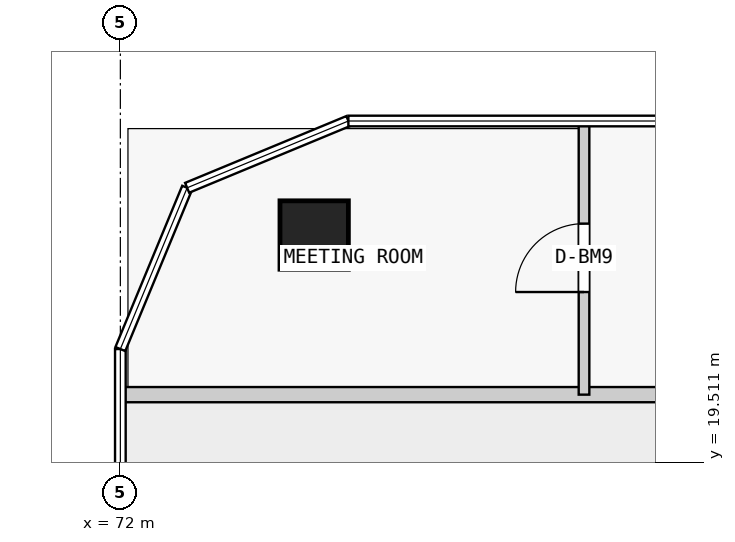
"""IFC4 building model, lengths in metres.
Left out: names, types, materials, properties, quantities, classifications, styles, units other than length and angle.
Written with IfcOpenShell. Run it as: python <this file> out.ifc"""

import sys

from ifc_helpers import new_model, si_unit, direction, frame, frame_2d, origin, origin_2d, place, context, subcontext, project, spatial, rectangle, extrude, element, fill, save


model = new_model("IFC4")
c1 = context("Model", 3, precision=1e-05, world=origin(), true_north=direction((0.0, 1.0)))
c2 = subcontext(c1, "Body", "Model", "MODEL_VIEW")
j1 = project(units=[si_unit("LENGTHUNIT", "METRE"), si_unit("PLANEANGLEUNIT", "RADIAN")], contexts=[c1])
p1 = place(None, origin())
s1 = spatial("IfcSite", under=j1, at=p1, CompositionType="ELEMENT")
p2 = place(p1, origin())
s2 = spatial("IfcBuilding", under=s1, at=p2, CompositionType="ELEMENT")
p3 = place(p2, frame((0.0, 0.0, 33.8)))
s3 = spatial("IfcBuildingStorey", under=s2, at=p3, CompositionType="ELEMENT", Elevation=33.8)
p4 = place(p3, frame((74.55, 22.5, 0.0), z_axis=(0.0, 0.0, 1.0), x_axis=(1.0, 0.0, 0.0)))
e1 = element("IfcColumn", 1, at=p4, inside=s3, PredefinedType="COLUMN", context=c2, shape_type="SweptSolid", body=[
    extrude(rectangle(XDim=0.9, YDim=0.9, at=origin_2d()), origin(), (0.0, 0.0, 1.0), 3.5),
])
p5 = place(p3, frame((72.0, 20.4, 0.0), z_axis=(0.0, 0.0, 1.0), x_axis=(1.0, 0.0, 0.0)))
e2 = element("IfcWall", 2, at=p5, inside=s3, PredefinedType="PARTITIONING", context=c2, shape_type="SweptSolid", body=[
    extrude(rectangle(XDim=20.0, YDim=0.2, at=frame_2d((10.0, 0.0))), origin(), (0.0, 0.0, 1.0), 3.25),
])
p6 = place(p3, frame((78.1, 20.4, 0.0), z_axis=(0.0, 0.0, 1.0), x_axis=(0.0, 1.0, 0.0)))
e3 = element("IfcWall", 3, at=p6, inside=s3, PredefinedType="PARTITIONING", context=c2, shape_type="SweptSolid", body=[
    extrude(rectangle(XDim=3.6, YDim=0.14, at=frame_2d((1.8, 0.0))), origin(), (0.0, 0.0, 1.0), 3.25),
])
p7 = place(p6, frame((1.35, 0.0, 0.0)))
e4 = element("IfcOpeningElement", 4, at=p7, cuts=e3, PredefinedType="OPENING", context=c2, shape_type="SweptSolid", body=[
    extrude(rectangle(XDim=0.9, YDim=2.4, at=frame_2d((0.45, 1.2))), frame((0.0, 0.08, 0.0), z_axis=(0.0, -1.0, 0.0), x_axis=(1.0, 0.0, 0.0)), (0.0, 0.0, 1.0), 0.16),
])
p8 = place(p7, origin())
e5 = element("IfcDoor", 5, at=p8, inside=s3, OperationType="SINGLE_SWING_LEFT", PredefinedType="DOOR", context=c2, shape_type="SweptSolid", body=[
    extrude(rectangle(XDim=0.9, YDim=2.4, at=frame_2d((0.45, 1.2))), frame((0.0, 0.025, 0.0), z_axis=(0.0, -1.0, 0.0), x_axis=(1.0, 0.0, 0.0)), (0.0, 0.0, 1.0), 0.05),
])
fill(e4, e5)
save(model, sys.argv[1])
